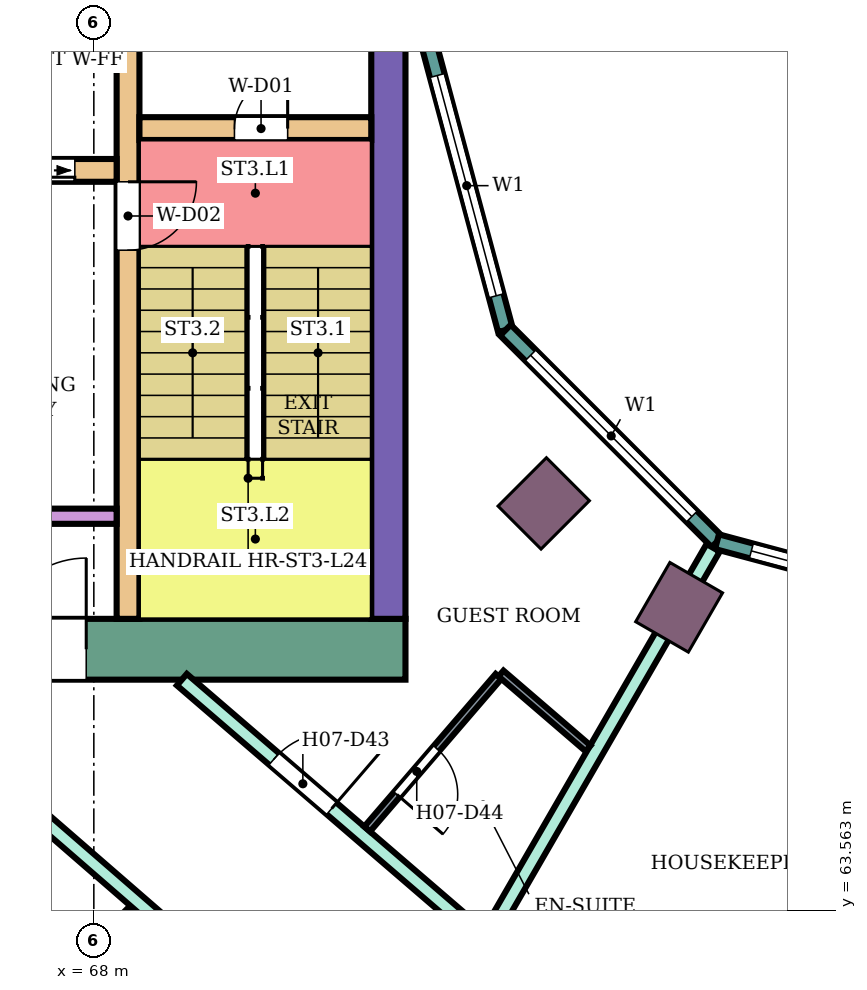
"""IFC4 building model, lengths in metres.
Left out: names, types, materials, properties, quantities, classifications, styles, units other than length and angle.
Written with IfcOpenShell. Run it as: python <this file> out.ifc"""

import sys

from ifc_helpers import new_model, si_unit, direction, frame, frame_2d, origin, origin_2d, place, context, subcontext, project, spatial, rectangle, extrude, element, fill, save


model = new_model("IFC4")
c1 = context("Model", 3, precision=1e-05, world=origin(), true_north=direction((0.0, 1.0)))
c2 = subcontext(c1, "Body", "Model", "MODEL_VIEW")
j1 = project(units=[si_unit("LENGTHUNIT", "METRE"), si_unit("PLANEANGLEUNIT", "RADIAN")], contexts=[c1])
p1 = place(None, origin())
s1 = spatial("IfcSite", under=j1, at=p1, CompositionType="ELEMENT")
p2 = place(p1, origin())
s2 = spatial("IfcBuilding", under=s1, at=p2, CompositionType="ELEMENT")
p3 = place(p2, frame((0.0, 0.0, 105.2)))
s3 = spatial("IfcBuildingStorey", under=s2, at=p3, CompositionType="ELEMENT", Elevation=105.2)
for number, where, z_axis, x_axis in (
    (1, (73.919, 68.919, 0.0), (0.0, 0.0, 1.0), (-0.707, -0.707, 0.0)),
    (2, (75.7, 67.552, 0.0), (0.0, 0.0, 1.0), (-0.5, -0.866, 0.0)),
):
    element("IfcColumn", number, at=place(p3, frame(where, z_axis=z_axis, x_axis=x_axis)), inside=s3, PredefinedType="COLUMN", context=c2, shape_type="SweptSolid", body=[
        extrude(rectangle(XDim=0.9, YDim=0.8, at=origin_2d()), origin(), (0.0, 0.0, 1.0), 3.8),
    ])
p4 = place(p3, frame((72.1, 67.0, 0.0), z_axis=(0.0, 0.0, 1.0), x_axis=(-1.0, 0.0, 0.0)))
e3 = element("IfcWall", 3, at=p4, inside=s3, PredefinedType="SHEAR", context=c2, shape_type="SweptSolid", body=[
    extrude(rectangle(XDim=14.7, YDim=0.8, at=frame_2d((7.35, 0.0))), origin(), (0.0, 0.0, 1.0), 3.45),
])
p5 = place(p4, frame((4.2, 0.0, 0.0)))
e4 = element("IfcOpeningElement", 4, at=p5, cuts=e3, PredefinedType="OPENING", context=c2, shape_type="SweptSolid", body=[
    extrude(rectangle(XDim=2.4, YDim=2.4, at=frame_2d((1.2, 1.2))), frame((0.0, 0.41, 0.0), z_axis=(0.0, -1.0, 0.0), x_axis=(1.0, 0.0, 0.0)), (0.0, 0.0, 1.0), 0.82),
])
p6 = place(p3, frame((71.875, 75.0, 0.0), z_axis=(0.0, 0.0, 1.0), x_axis=(0.0, -1.0, 0.0)))
e5 = element("IfcWall", 5, at=p6, inside=s3, PredefinedType="SHEAR", context=c2, shape_type="SweptSolid", body=[
    extrude(rectangle(XDim=7.6, YDim=0.45, at=frame_2d((3.8, 0.0))), origin(), (0.0, 0.0, 1.0), 3.45),
])
p7 = place(p3, frame((68.45, 75.0, 0.0), z_axis=(0.0, 0.0, 1.0), x_axis=(0.0, -1.0, 0.0)))
e6 = element("IfcWall", 6, at=p7, inside=s3, PredefinedType="SHEAR", context=c2, shape_type="SweptSolid", body=[
    extrude(rectangle(XDim=7.6, YDim=0.3, at=frame_2d((3.8, 0.0))), origin(), (0.0, 0.0, 1.0), 3.45),
])
p8 = place(p7, frame((1.85, 0.0, 0.0)))
e7 = element("IfcOpeningElement", 7, at=p8, cuts=e6, PredefinedType="OPENING", context=c2, shape_type="SweptSolid", body=[
    extrude(rectangle(XDim=0.9, YDim=2.1, at=frame_2d((0.45, 1.05))), frame((0.0, 0.16, 0.0), z_axis=(0.0, -1.0, 0.0), x_axis=(1.0, 0.0, 0.0)), (0.0, 0.0, 1.0), 0.32),
])
p9 = place(p3, frame((71.65, 73.85, 0.0), z_axis=(0.0, 0.0, 1.0), x_axis=(-1.0, 0.0, 0.0)))
e8 = element("IfcWall", 8, at=p9, inside=s3, PredefinedType="SHEAR", context=c2, shape_type="SweptSolid", body=[
    extrude(rectangle(XDim=3.05, YDim=0.3, at=frame_2d((1.525, 0.0))), origin(), (0.0, 0.0, 1.0), 3.45),
])
p10 = place(p9, frame((1.1, 0.0, 0.0)))
e9 = element("IfcOpeningElement", 9, at=p10, cuts=e8, PredefinedType="OPENING", context=c2, shape_type="SweptSolid", body=[
    extrude(rectangle(XDim=0.7, YDim=2.0, at=frame_2d((0.35, 1.0))), frame((0.0, 0.16, 0.0), z_axis=(0.0, -1.0, 0.0), x_axis=(1.0, 0.0, 0.0)), (0.0, 0.0, 1.0), 0.32),
])
p11 = place(p3, frame((68.3, 73.3, 0.0), z_axis=(0.0, 0.0, 1.0), x_axis=(-1.0, 0.0, 0.0)))
e10 = element("IfcWall", 10, at=p11, inside=s3, PredefinedType="SHEAR", context=c2, shape_type="SweptSolid", body=[
    extrude(rectangle(XDim=10.9, YDim=0.3, at=frame_2d((5.45, 0.0))), origin(), (0.0, 0.0, 1.0), 3.45),
])
p12 = place(p11, frame((0.55, 0.0, 0.0)))
e11 = element("IfcOpeningElement", 11, at=p12, cuts=e10, PredefinedType="OPENING", context=c2, shape_type="SweptSolid", body=[
    extrude(rectangle(XDim=1.1, YDim=2.1, at=frame_2d((0.55, 1.05))), frame((0.0, 0.16, 0.0), z_axis=(0.0, -1.0, 0.0), x_axis=(1.0, 0.0, 0.0)), (0.0, 0.0, 1.0), 0.32),
])
p13 = place(p11, frame((8.1, 0.0, 0.0)))
e12 = element("IfcOpeningElement", 12, at=p13, cuts=e10, PredefinedType="OPENING", context=c2, shape_type="SweptSolid", body=[
    extrude(rectangle(XDim=1.0, YDim=2.1, at=frame_2d((0.5, 1.05))), frame((0.0, 0.16, 0.0), z_axis=(0.0, -1.0, 0.0), x_axis=(1.0, 0.0, 0.0)), (0.0, 0.0, 1.0), 0.32),
])
p14 = place(p3, frame((68.3, 68.75, 0.0), z_axis=(0.0, 0.0, 1.0), x_axis=(-1.0, 0.0, 0.0)))
e13 = element("IfcWall", 13, at=p14, inside=s3, PredefinedType="SHEAR", context=c2, shape_type="SweptSolid", body=[
    extrude(rectangle(XDim=4.65, YDim=0.2, at=frame_2d((2.325, 0.0))), origin(), (0.0, 0.0, 1.0), 3.45),
])
p15 = place(p3, frame((72.396, 75.0, 0.0), z_axis=(0.0, 0.0, 1.0), x_axis=(0.258789828301, -0.965933654434, 0.0)))
e14 = element("IfcWall", 14, at=p15, inside=s3, PredefinedType="NOTDEFINED", context=c2, shape_type="SweptSolid", body=[
    extrude(rectangle(XDim=3.936, YDim=0.2, at=frame_2d((1.968, 0.0))), origin(), (0.0, 0.0, 1.0), 3.8),
])
p16 = place(p15, frame((0.468, 0.0, 0.9)))
e15 = element("IfcOpeningElement", 15, at=p16, cuts=e14, PredefinedType="OPENING", context=c2, shape_type="SweptSolid", body=[
    extrude(rectangle(XDim=3.0, YDim=2.3, at=frame_2d((1.5, 1.15))), frame((0.0, 0.11, 0.0), z_axis=(0.0, -1.0, 0.0), x_axis=(1.0, 0.0, 0.0)), (0.0, 0.0, 1.0), 0.22),
])
p17 = place(p3, frame((73.415, 71.198, 0.0), z_axis=(0.0, 0.0, 1.0), x_axis=(0.707106781187, -0.707106781187, 0.0)))
e16 = element("IfcWall", 16, at=p17, inside=s3, PredefinedType="NOTDEFINED", context=c2, shape_type="SweptSolid", body=[
    extrude(rectangle(XDim=3.936, YDim=0.2, at=frame_2d((1.968, 0.0))), origin(), (0.0, 0.0, 1.0), 3.8),
])
p18 = place(p17, frame((0.468, 0.0, 0.9)))
e17 = element("IfcOpeningElement", 17, at=p18, cuts=e16, PredefinedType="OPENING", context=c2, shape_type="SweptSolid", body=[
    extrude(rectangle(XDim=3.0, YDim=2.3, at=frame_2d((1.5, 1.15))), frame((0.0, 0.11, 0.0), z_axis=(0.0, -1.0, 0.0), x_axis=(1.0, 0.0, 0.0)), (0.0, 0.0, 1.0), 0.22),
])
p19 = place(p3, frame((76.198, 68.415, 0.0), z_axis=(0.0, 0.0, 1.0), x_axis=(0.965933654434, -0.258789828301, 0.0)))
e18 = element("IfcWall", 18, at=p19, inside=s3, PredefinedType="NOTDEFINED", context=c2, shape_type="SweptSolid", body=[
    extrude(rectangle(XDim=3.936, YDim=0.2, at=frame_2d((1.968, 0.0))), origin(), (0.0, 0.0, 1.0), 3.8),
])
p20 = place(p19, frame((0.468, 0.0, 0.9)))
e19 = element("IfcOpeningElement", 19, at=p20, cuts=e18, PredefinedType="OPENING", context=c2, shape_type="SweptSolid", body=[
    extrude(rectangle(XDim=3.0, YDim=2.3, at=frame_2d((1.5, 1.15))), frame((0.0, 0.11, 0.0), z_axis=(0.0, -1.0, 0.0), x_axis=(1.0, 0.0, 0.0)), (0.0, 0.0, 1.0), 0.22),
])
p21 = place(p3, frame((63.592, 58.599, 0.0), z_axis=(0.0, 0.0, 1.0), x_axis=(0.707281009781, 0.706932509653, 0.0)))
e20 = element("IfcWall", 20, at=p21, inside=s3, PredefinedType="PARTITIONING", context=c2, shape_type="SweptSolid", body=[
    extrude(rectangle(XDim=7.005, YDim=0.2, at=frame_2d((3.503, 0.0))), origin(), (0.0, 0.0, 1.0), 3.35),
])
p22 = place(p3, frame((67.082, 64.972, 0.0), z_axis=(0.0, 0.0, 1.0), x_axis=(0.755033632617, -0.655686063309, 0.0)))
e21 = element("IfcWall", 21, at=p22, inside=s3, PredefinedType="PARTITIONING", context=c2, shape_type="SweptSolid", body=[
    extrude(rectangle(XDim=6.185, YDim=0.2, at=frame_2d((3.093, 0.0))), origin(), (0.0, 0.0, 1.0), 3.35),
])
p23 = place(p22, frame((4.778, 0.0, 0.0)))
e22 = element("IfcOpeningElement", 22, at=p23, cuts=e21, PredefinedType="OPENING", context=c2, shape_type="SweptSolid", body=[
    extrude(rectangle(XDim=1.1, YDim=2.1, at=frame_2d((0.55, 1.05))), frame((0.0, 0.11, 0.0), z_axis=(0.0, -1.0, 0.0), x_axis=(1.0, 0.0, 0.0)), (0.0, 0.0, 1.0), 0.22),
])
p24 = place(p3, frame((69.158, 66.6, 0.0), z_axis=(0.0, 0.0, 1.0), x_axis=(0.757976058094, -0.652282373943, 0.0)))
e23 = element("IfcWall", 23, at=p24, inside=s3, PredefinedType="PARTITIONING", context=c2, shape_type="SweptSolid", body=[
    extrude(rectangle(XDim=5.16, YDim=0.2, at=frame_2d((2.58, 0.0))), origin(), (0.0, 0.0, 1.0), 3.35),
])
p25 = place(p24, frame((1.6, 0.0, 0.0)))
e24 = element("IfcOpeningElement", 24, at=p25, cuts=e23, PredefinedType="OPENING", context=c2, shape_type="SweptSolid", body=[
    extrude(rectangle(XDim=1.0, YDim=2.1, at=frame_2d((0.5, 1.05))), frame((0.0, 0.11, 0.0), z_axis=(0.0, -1.0, 0.0), x_axis=(1.0, 0.0, 0.0)), (0.0, 0.0, 1.0), 0.22),
])
p26 = place(p3, frame((73.169, 63.178, 0.0), z_axis=(0.0, 0.0, 1.0), x_axis=(0.500257106344, 0.865876912472, 0.0)))
e25 = element("IfcWall", 25, at=p26, inside=s3, PredefinedType="PARTITIONING", context=c2, shape_type="SweptSolid", body=[
    extrude(rectangle(XDim=5.955, YDim=0.2, at=frame_2d((2.978, 0.0))), origin(), (0.0, 0.0, 1.0), 3.35),
])
p27 = place(p3, frame((71.596, 64.635, 0.0), z_axis=(0.0, 0.0, 1.0), x_axis=(0.652285007511, 0.757973791748, 0.0)))
e26 = element("IfcWall", 26, at=p27, inside=s3, PredefinedType="PARTITIONING", context=c2, shape_type="SweptSolid", body=[
    extrude(rectangle(XDim=2.65, YDim=0.1, at=frame_2d((1.325, 0.0))), origin(), (0.0, 0.0, 1.0), 3.35),
])
p28 = place(p27, frame((0.6, 0.0, 0.0)))
e27 = element("IfcOpeningElement", 27, at=p28, cuts=e26, PredefinedType="OPENING", context=c2, shape_type="SweptSolid", body=[
    extrude(rectangle(XDim=0.8, YDim=2.1, at=frame_2d((0.4, 1.05))), frame((0.0, 0.06, 0.0), z_axis=(0.0, -1.0, 0.0), x_axis=(1.0, 0.0, 0.0)), (0.0, 0.0, 1.0), 0.12),
])
p29 = place(p3, frame((73.357, 66.681, 0.0), z_axis=(0.0, 0.0, 1.0), x_axis=(0.758263469747, -0.651948242154, 0.0)))
e28 = element("IfcWall", 28, at=p29, inside=s3, PredefinedType="PARTITIONING", context=c2, shape_type="SweptSolid", body=[
    extrude(rectangle(XDim=1.511, YDim=0.1, at=frame_2d((0.755, 0.0))), origin(), (0.0, 0.0, 1.0), 3.35),
])
p30 = place(p16, origin())
e29 = element("IfcWindow", 29, at=p30, inside=s3, PartitioningType="SINGLE_PANEL", PredefinedType="WINDOW", context=c2, shape_type="SweptSolid", body=[
    extrude(rectangle(XDim=3.0, YDim=2.3, at=frame_2d((1.5, 1.15))), frame((0.0, 0.03, 0.0), z_axis=(0.0, -1.0, 0.0), x_axis=(1.0, 0.0, 0.0)), (0.0, 0.0, 1.0), 0.06),
])
fill(e15, e29)
p31 = place(p18, origin())
e30 = element("IfcWindow", 30, at=p31, inside=s3, PartitioningType="SINGLE_PANEL", PredefinedType="WINDOW", context=c2, shape_type="SweptSolid", body=[
    extrude(rectangle(XDim=3.0, YDim=2.3, at=frame_2d((1.5, 1.15))), frame((0.0, 0.03, 0.0), z_axis=(0.0, -1.0, 0.0), x_axis=(1.0, 0.0, 0.0)), (0.0, 0.0, 1.0), 0.06),
])
fill(e17, e30)
p32 = place(p20, origin())
e31 = element("IfcWindow", 31, at=p32, inside=s3, PartitioningType="SINGLE_PANEL", PredefinedType="WINDOW", context=c2, shape_type="SweptSolid", body=[
    extrude(rectangle(XDim=3.0, YDim=2.3, at=frame_2d((1.5, 1.15))), frame((0.0, 0.03, 0.0), z_axis=(0.0, -1.0, 0.0), x_axis=(1.0, 0.0, 0.0)), (0.0, 0.0, 1.0), 0.06),
])
fill(e19, e31)
p33 = place(p25, origin())
e32 = element("IfcDoor", 32, at=p33, inside=s3, OperationType="SINGLE_SWING_RIGHT", PredefinedType="DOOR", context=c2, shape_type="SweptSolid", body=[
    extrude(rectangle(XDim=1.0, YDim=2.1, at=frame_2d((0.5, 1.05))), frame((0.0, 0.025, 0.0), z_axis=(0.0, -1.0, 0.0), x_axis=(1.0, 0.0, 0.0)), (0.0, 0.0, 1.0), 0.05),
])
fill(e24, e32)
p34 = place(p28, frame((0.8, 0.0, 0.0), z_axis=(0.0, 0.0, 1.0), x_axis=(-1.0, 0.0, 0.0)))
e33 = element("IfcDoor", 33, at=p34, inside=s3, OperationType="SINGLE_SWING_RIGHT", PredefinedType="DOOR", context=c2, shape_type="SweptSolid", body=[
    extrude(rectangle(XDim=0.8, YDim=2.1, at=frame_2d((0.4, 1.05))), frame((0.0, 0.025, 0.0), z_axis=(0.0, -1.0, 0.0), x_axis=(1.0, 0.0, 0.0)), (0.0, 0.0, 1.0), 0.05),
])
fill(e27, e33)
p35 = place(p10, frame((0.7, 0.0, 0.0), z_axis=(0.0, 0.0, 1.0), x_axis=(-1.0, 0.0, 0.0)))
e34 = element("IfcDoor", 34, at=p35, inside=s3, OperationType="SINGLE_SWING_RIGHT", PredefinedType="DOOR", context=c2, shape_type="SweptSolid", body=[
    extrude(rectangle(XDim=0.7, YDim=2.0, at=frame_2d((0.35, 1.0))), frame((0.0, 0.025, 0.0), z_axis=(0.0, -1.0, 0.0), x_axis=(1.0, 0.0, 0.0)), (0.0, 0.0, 1.0), 0.05),
])
fill(e9, e34)
p36 = place(p8, origin())
e35 = element("IfcDoor", 35, at=p36, inside=s3, OperationType="SINGLE_SWING_LEFT", PredefinedType="DOOR", context=c2, shape_type="SweptSolid", body=[
    extrude(rectangle(XDim=0.9, YDim=2.1, at=frame_2d((0.45, 1.05))), frame((0.0, 0.025, 0.0), z_axis=(0.0, -1.0, 0.0), x_axis=(1.0, 0.0, 0.0)), (0.0, 0.0, 1.0), 0.05),
])
fill(e7, e35)
p37 = place(p12, origin())
e36 = element("IfcDoor", 36, at=p37, inside=s3, OperationType="DOUBLE_DOOR_SLIDING", PredefinedType="DOOR", context=c2, shape_type="SweptSolid", body=[
    extrude(rectangle(XDim=1.1, YDim=2.1, at=frame_2d((0.55, 1.05))), frame((0.0, 0.025, 0.0), z_axis=(0.0, -1.0, 0.0), x_axis=(1.0, 0.0, 0.0)), (0.0, 0.0, 1.0), 0.05),
])
fill(e11, e36)
p38 = place(p5, frame((2.4, 0.0, 0.0), z_axis=(0.0, 0.0, 1.0), x_axis=(-1.0, 0.0, 0.0)))
e37 = element("IfcDoor", 37, at=p38, inside=s3, OperationType="DOUBLE_DOOR_SINGLE_SWING", PredefinedType="DOOR", context=c2, shape_type="SweptSolid", body=[
    extrude(rectangle(XDim=2.4, YDim=2.4, at=frame_2d((1.2, 1.2))), frame((0.0, 0.025, 0.0), z_axis=(0.0, -1.0, 0.0), x_axis=(1.0, 0.0, 0.0)), (0.0, 0.0, 1.0), 0.05),
])
fill(e4, e37)
save(model, sys.argv[1])
